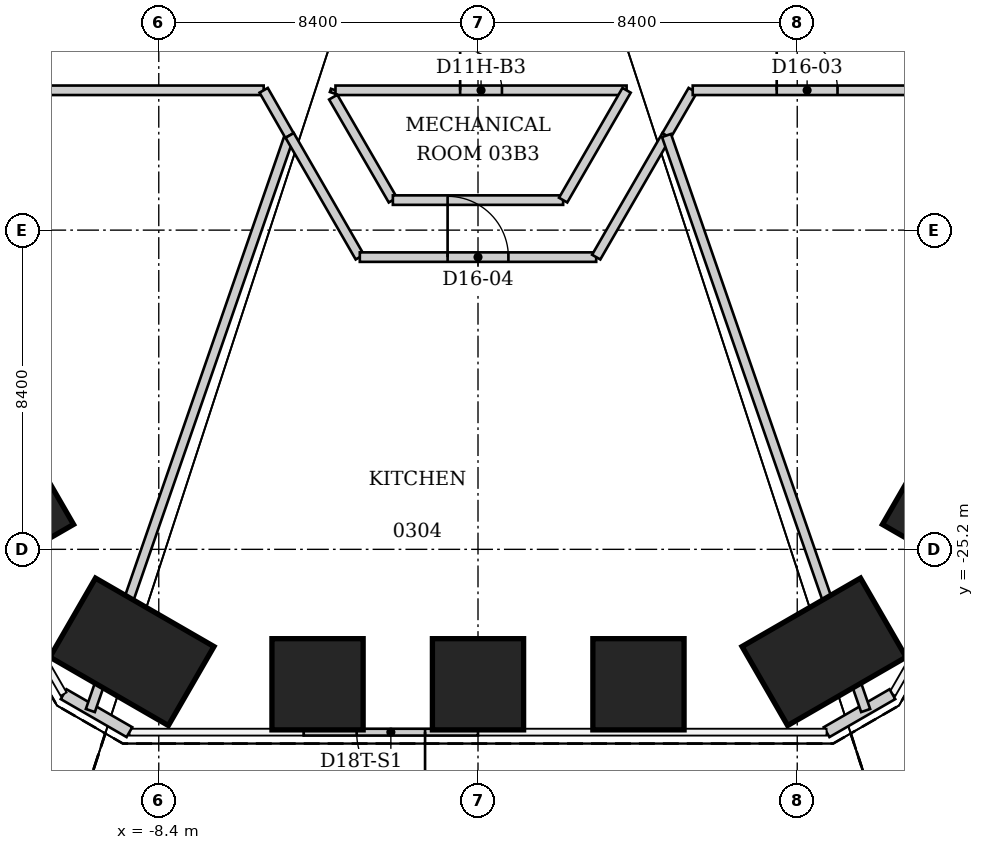
"""IFC4 building model, lengths in metres.
Left out: names, types, materials, properties, quantities, classifications, styles, units other than length and angle.
Written with IfcOpenShell. Run it as: python <this file> out.ifc"""

import sys

from ifc_helpers import new_model, si_unit, direction, frame, frame_2d, origin, origin_2d, place, context, subcontext, project, spatial, rectangle, extrude, element, fill, save


model = new_model("IFC4")
c1 = context("Model", 3, precision=1e-05, world=origin(), true_north=direction((0.0, 1.0)))
c2 = subcontext(c1, "Body", "Model", "MODEL_VIEW")
j1 = project(units=[si_unit("LENGTHUNIT", "METRE"), si_unit("PLANEANGLEUNIT", "RADIAN")], contexts=[c1])
p1 = place(None, origin())
s1 = spatial("IfcSite", under=j1, at=p1, CompositionType="ELEMENT")
p2 = place(p1, origin())
s2 = spatial("IfcBuilding", under=s1, at=p2, CompositionType="ELEMENT")
p3 = place(p2, frame((0.0, 0.0, 18.0)))
s3 = spatial("IfcBuildingStorey", under=s2, at=p3, CompositionType="ELEMENT", Elevation=18.0)
p4 = place(p3, frame((12.282, -24.105, 0.0), z_axis=(0.0, 0.0, 1.0), x_axis=(0.866025403784, -0.5, 0.0)))
e1 = element("IfcColumn", 1, at=p4, inside=s3, PredefinedType="COLUMN", context=c2, shape_type="SweptSolid", body=[
    extrude(rectangle(XDim=2.4, YDim=2.4, at=origin_2d()), origin(), (0.0, 0.0, 1.0), 5.0),
])
p5 = place(p3, frame((9.106, -27.897, 0.0), z_axis=(0.0, 0.0, 1.0), x_axis=(0.5, -0.866025403784, 0.0)))
e2 = element("IfcColumn", 2, at=p5, inside=s3, PredefinedType="COLUMN", context=c2, shape_type="SweptSolid", body=[
    extrude(rectangle(XDim=2.4, YDim=3.6, at=origin_2d()), origin(), (0.0, 0.0, 1.0), 5.0),
])
for number, where, z_axis, x_axis in (
    (3, (4.222, -28.751, 0.0), (0.0, 0.0, 1.0), (0.0, -1.0, 0.0)),
    (4, (0.0, -28.751, 0.0), (0.0, 0.0, 1.0), (0.0, -1.0, 0.0)),
    (5, (-4.222, -28.751, 0.0), (0.0, 0.0, 1.0), (0.0, -1.0, 0.0)),
):
    element("IfcColumn", number, at=place(p3, frame(where, z_axis=z_axis, x_axis=x_axis)), inside=s3, PredefinedType="COLUMN", context=c2, shape_type="SweptSolid", body=[
        extrude(rectangle(XDim=2.4, YDim=2.4, at=origin_2d()), origin(), (0.0, 0.0, 1.0), 5.0),
    ])
p6 = place(p3, frame((-9.106, -27.897, 0.0), z_axis=(0.0, 0.0, 1.0), x_axis=(-0.5, -0.866025403784, 0.0)))
e6 = element("IfcColumn", 6, at=p6, inside=s3, PredefinedType="COLUMN", context=c2, shape_type="SweptSolid", body=[
    extrude(rectangle(XDim=2.4, YDim=3.6, at=origin_2d()), origin(), (0.0, 0.0, 1.0), 5.0),
])
p7 = place(p3, frame((-12.282, -24.105, 0.0), z_axis=(0.0, 0.0, 1.0), x_axis=(-0.866025403784, -0.5, 0.0)))
e7 = element("IfcColumn", 7, at=p7, inside=s3, PredefinedType="COLUMN", context=c2, shape_type="SweptSolid", body=[
    extrude(rectangle(XDim=2.4, YDim=2.4, at=origin_2d()), origin(), (0.0, 0.0, 1.0), 5.0),
])
p8 = place(p3, frame((10.904, -29.011, 0.0), z_axis=(0.0, 0.0, 1.0), x_axis=(-0.866010750942, -0.50002537861, 0.0)))
e8 = element("IfcWall", 8, at=p8, inside=s3, PredefinedType="SOLIDWALL", context=c2, shape_type="SweptSolid", body=[
    extrude(rectangle(XDim=2.0, YDim=0.3, at=frame_2d((1.0, 0.0))), origin(), (0.0, 0.0, 1.0), 4.84),
])
p9 = place(p3, frame((0.0, -30.011, 0.0), z_axis=(0.0, 0.0, 1.0), x_axis=(-1.0, 0.0, 0.0)))
e9 = element("IfcWall", 9, at=p9, inside=s3, PredefinedType="SOLIDWALL", context=c2, shape_type="SweptSolid", body=[
    extrude(rectangle(XDim=4.586, YDim=0.18, at=frame_2d((2.293, 0.0))), origin(), (0.0, 0.0, 1.0), 4.84),
])
p10 = place(p9, frame((1.393, 0.0, 0.0)))
e10 = element("IfcOpeningElement", 10, at=p10, cuts=e9, PredefinedType="OPENING", context=c2, shape_type="SweptSolid", body=[
    extrude(rectangle(XDim=1.8, YDim=2.4, at=frame_2d((0.9, 1.2))), frame((0.0, 0.09, 0.0), z_axis=(0.0, -1.0, 0.0), x_axis=(1.0, 0.0, 0.0)), (0.0, 0.0, 1.0), 0.18),
])
p11 = place(p3, frame((-9.172, -30.011, 0.0), z_axis=(0.0, 0.0, 1.0), x_axis=(-0.866010750942, 0.50002537861, 0.0)))
e11 = element("IfcWall", 11, at=p11, inside=s3, PredefinedType="SOLIDWALL", context=c2, shape_type="SweptSolid", body=[
    extrude(rectangle(XDim=2.0, YDim=0.3, at=frame_2d((1.0, 0.0))), origin(), (0.0, 0.0, 1.0), 4.84),
])
p12 = place(p3, frame((-11.67, -13.12, 0.0), z_axis=(0.0, 0.0, 1.0), x_axis=(1.0, 0.0, 0.0)))
e12 = element("IfcWall", 12, at=p12, inside=s3, PredefinedType="PARTITIONING", context=c2, shape_type="SweptSolid", body=[
    extrude(rectangle(XDim=6.03, YDim=0.25, at=frame_2d((3.015, 0.0))), origin(), (0.0, 0.0, 1.0), 4.84),
])
p13 = place(p3, frame((-10.2, -29.442, 0.0), z_axis=(0.0, 0.0, 1.0), x_axis=(0.327243042936, 0.944940204907, 0.0)))
e13 = element("IfcWall", 13, at=p13, inside=s3, PredefinedType="PARTITIONING", context=c2, shape_type="SweptSolid", body=[
    extrude(rectangle(XDim=16.013, YDim=0.25, at=frame_2d((8.007, 0.0))), origin(), (0.0, 0.0, 1.0), 4.84),
])
p14 = place(p3, frame((-5.64, -13.12, 0.0), z_axis=(0.0, 0.0, 1.0), x_axis=(0.496177297153, -0.868221221688, 0.0)))
e14 = element("IfcWall", 14, at=p14, inside=s3, PredefinedType="PARTITIONING", context=c2, shape_type="SweptSolid", body=[
    extrude(rectangle(XDim=1.371, YDim=0.25, at=frame_2d((0.686, 0.0))), origin(), (0.0, 0.0, 1.0), 4.84),
])
p15 = place(p3, frame((-3.778, -13.205, 0.0), z_axis=(0.0, 0.0, 1.0), x_axis=(0.316227766017, 0.948683298051, 0.0)))
e15 = element("IfcWall", 15, at=p15, inside=s3, PredefinedType="PARTITIONING", context=c2, shape_type="SweptSolid", body=[
    extrude(rectangle(XDim=0.09, YDim=0.25, at=frame_2d((0.045, 0.0))), origin(), (0.0, 0.0, 1.0), 4.84),
])
p16 = place(p3, frame((-3.75, -13.12, 0.0), z_axis=(0.0, 0.0, 1.0), x_axis=(1.0, 0.0, 0.0)))
e16 = element("IfcWall", 16, at=p16, inside=s3, PredefinedType="PARTITIONING", context=c2, shape_type="SweptSolid", body=[
    extrude(rectangle(XDim=7.66, YDim=0.25, at=frame_2d((3.83, 0.0))), origin(), (0.0, 0.0, 1.0), 4.84),
])
p17 = place(p16, frame((3.28, 0.0, 0.0)))
e17 = element("IfcOpeningElement", 17, at=p17, cuts=e16, PredefinedType="OPENING", context=c2, shape_type="SweptSolid", body=[
    extrude(rectangle(XDim=1.1, YDim=2.2, at=frame_2d((0.55, 1.1))), frame((0.0, 0.125, 0.0), z_axis=(0.0, -1.0, 0.0), x_axis=(1.0, 0.0, 0.0)), (0.0, 0.0, 1.0), 0.25),
])
p18 = place(p3, frame((-3.11, -17.51, 0.0), z_axis=(0.0, 0.0, 1.0), x_axis=(-0.499272571119, 0.8664449779, 0.0)))
e18 = element("IfcWall", 18, at=p18, inside=s3, PredefinedType="PARTITIONING", context=c2, shape_type="SweptSolid", body=[
    extrude(rectangle(XDim=3.696, YDim=0.25, at=frame_2d((1.848, 0.0))), origin(), (0.0, 0.0, 1.0), 4.84),
])
p19 = place(p3, frame((-3.11, -17.51, 0.0), z_axis=(0.0, 0.0, 1.0), x_axis=(1.0, 0.0, 0.0)))
e19 = element("IfcWall", 19, at=p19, inside=s3, PredefinedType="PARTITIONING", context=c2, shape_type="SweptSolid", body=[
    extrude(rectangle(XDim=6.22, YDim=0.25, at=frame_2d((3.11, 0.0))), origin(), (0.0, 0.0, 1.0), 4.84),
])
p20 = place(p19, frame((2.31, 0.0, 0.0)))
e20 = element("IfcOpeningElement", 20, at=p20, cuts=e19, PredefinedType="OPENING", context=c2, shape_type="SweptSolid", body=[
    extrude(rectangle(XDim=1.6, YDim=2.4, at=frame_2d((0.8, 1.2))), frame((0.0, 0.125, 0.0), z_axis=(0.0, -1.0, 0.0), x_axis=(1.0, 0.0, 0.0)), (0.0, 0.0, 1.0), 0.25),
])
p21 = place(p3, frame((-2.24, -16.01, 0.0), z_axis=(0.0, 0.0, 1.0), x_axis=(-0.501309724655, 0.865267912248, 0.0)))
e21 = element("IfcWall", 21, at=p21, inside=s3, PredefinedType="PARTITIONING", context=c2, shape_type="SweptSolid", body=[
    extrude(rectangle(XDim=3.132, YDim=0.25, at=frame_2d((1.566, 0.0))), origin(), (0.0, 0.0, 1.0), 4.84),
])
p22 = place(p3, frame((2.24, -16.01, 0.0), z_axis=(0.0, 0.0, 1.0), x_axis=(-1.0, 0.0, 0.0)))
e22 = element("IfcWall", 22, at=p22, inside=s3, PredefinedType="PARTITIONING", context=c2, shape_type="SweptSolid", body=[
    extrude(rectangle(XDim=4.48, YDim=0.25, at=frame_2d((2.24, 0.0))), origin(), (0.0, 0.0, 1.0), 4.84),
])
p23 = place(p3, frame((3.11, -17.51, 0.0), z_axis=(0.0, 0.0, 1.0), x_axis=(0.50047896955, 0.865748693928, 0.0)))
e23 = element("IfcWall", 23, at=p23, inside=s3, PredefinedType="PARTITIONING", context=c2, shape_type="SweptSolid", body=[
    extrude(rectangle(XDim=3.696, YDim=0.25, at=frame_2d((1.848, 0.0))), origin(), (0.0, 0.0, 1.0), 4.84),
])
p24 = place(p3, frame((3.91, -13.12, 0.0), z_axis=(0.0, 0.0, 1.0), x_axis=(-0.500323906295, -0.865838315616, 0.0)))
e24 = element("IfcWall", 24, at=p24, inside=s3, PredefinedType="PARTITIONING", context=c2, shape_type="SweptSolid", body=[
    extrude(rectangle(XDim=3.338, YDim=0.25, at=frame_2d((1.669, 0.0))), origin(), (0.0, 0.0, 1.0), 4.84),
])
p25 = place(p3, frame((4.96, -14.31, 0.0), z_axis=(0.0, 0.0, 1.0), x_axis=(0.501518885372, 0.865146697165, 0.0)))
e25 = element("IfcWall", 25, at=p25, inside=s3, PredefinedType="PARTITIONING", context=c2, shape_type="SweptSolid", body=[
    extrude(rectangle(XDim=1.376, YDim=0.25, at=frame_2d((0.688, 0.0))), origin(), (0.0, 0.0, 1.0), 4.84),
])
p26 = place(p3, frame((5.65, -13.12, 0.0), z_axis=(0.0, 0.0, 1.0), x_axis=(1.0, 0.0, 0.0)))
e26 = element("IfcWall", 26, at=p26, inside=s3, PredefinedType="PARTITIONING", context=c2, shape_type="SweptSolid", body=[
    extrude(rectangle(XDim=6.02, YDim=0.25, at=frame_2d((3.01, 0.0))), origin(), (0.0, 0.0, 1.0), 4.84),
])
p27 = place(p26, frame((2.21, 0.0, 0.0)))
e27 = element("IfcOpeningElement", 27, at=p27, cuts=e26, PredefinedType="OPENING", context=c2, shape_type="SweptSolid", body=[
    extrude(rectangle(XDim=1.6, YDim=2.4, at=frame_2d((0.8, 1.2))), frame((0.0, 0.125, 0.0), z_axis=(0.0, -1.0, 0.0), x_axis=(1.0, 0.0, 0.0)), (0.0, 0.0, 1.0), 0.25),
])
p28 = place(p3, frame((10.2, -29.442, 0.0), z_axis=(0.0, 0.0, 1.0), x_axis=(-0.327243042936, 0.944940204907, 0.0)))
e28 = element("IfcWall", 28, at=p28, inside=s3, PredefinedType="PARTITIONING", context=c2, shape_type="SweptSolid", body=[
    extrude(rectangle(XDim=16.013, YDim=0.25, at=frame_2d((8.007, 0.0))), origin(), (0.0, 0.0, 1.0), 4.84),
])
p29 = place(p10, origin())
e29 = element("IfcDoor", 29, at=p29, inside=s3, OperationType="SINGLE_SWING_LEFT", PredefinedType="DOOR", context=c2, shape_type="SweptSolid", body=[
    extrude(rectangle(XDim=1.8, YDim=2.4, at=frame_2d((0.9, 1.2))), frame((0.0, 0.025, 0.0), z_axis=(0.0, -1.0, 0.0), x_axis=(1.0, 0.0, 0.0)), (0.0, 0.0, 1.0), 0.05),
])
fill(e10, e29)
p30 = place(p27, origin())
e30 = element("IfcDoor", 30, at=p30, inside=s3, OperationType="DOUBLE_DOOR_SINGLE_SWING", PredefinedType="DOOR", context=c2, shape_type="SweptSolid", body=[
    extrude(rectangle(XDim=1.6, YDim=2.4, at=frame_2d((0.8, 1.2))), frame((0.0, 0.025, 0.0), z_axis=(0.0, -1.0, 0.0), x_axis=(1.0, 0.0, 0.0)), (0.0, 0.0, 1.0), 0.05),
])
fill(e27, e30)
p31 = place(p20, origin())
e31 = element("IfcDoor", 31, at=p31, inside=s3, OperationType="DOUBLE_DOOR_SINGLE_SWING", PredefinedType="DOOR", context=c2, shape_type="SweptSolid", body=[
    extrude(rectangle(XDim=1.6, YDim=2.4, at=frame_2d((0.8, 1.2))), frame((0.0, 0.025, 0.0), z_axis=(0.0, -1.0, 0.0), x_axis=(1.0, 0.0, 0.0)), (0.0, 0.0, 1.0), 0.05),
])
fill(e20, e31)
p32 = place(p17, origin())
e32 = element("IfcDoor", 32, at=p32, inside=s3, OperationType="SINGLE_SWING_LEFT", PredefinedType="DOOR", context=c2, shape_type="SweptSolid", body=[
    extrude(rectangle(XDim=1.1, YDim=2.2, at=frame_2d((0.55, 1.1))), frame((0.0, 0.025, 0.0), z_axis=(0.0, -1.0, 0.0), x_axis=(1.0, 0.0, 0.0)), (0.0, 0.0, 1.0), 0.05),
])
fill(e17, e32)
save(model, sys.argv[1])
